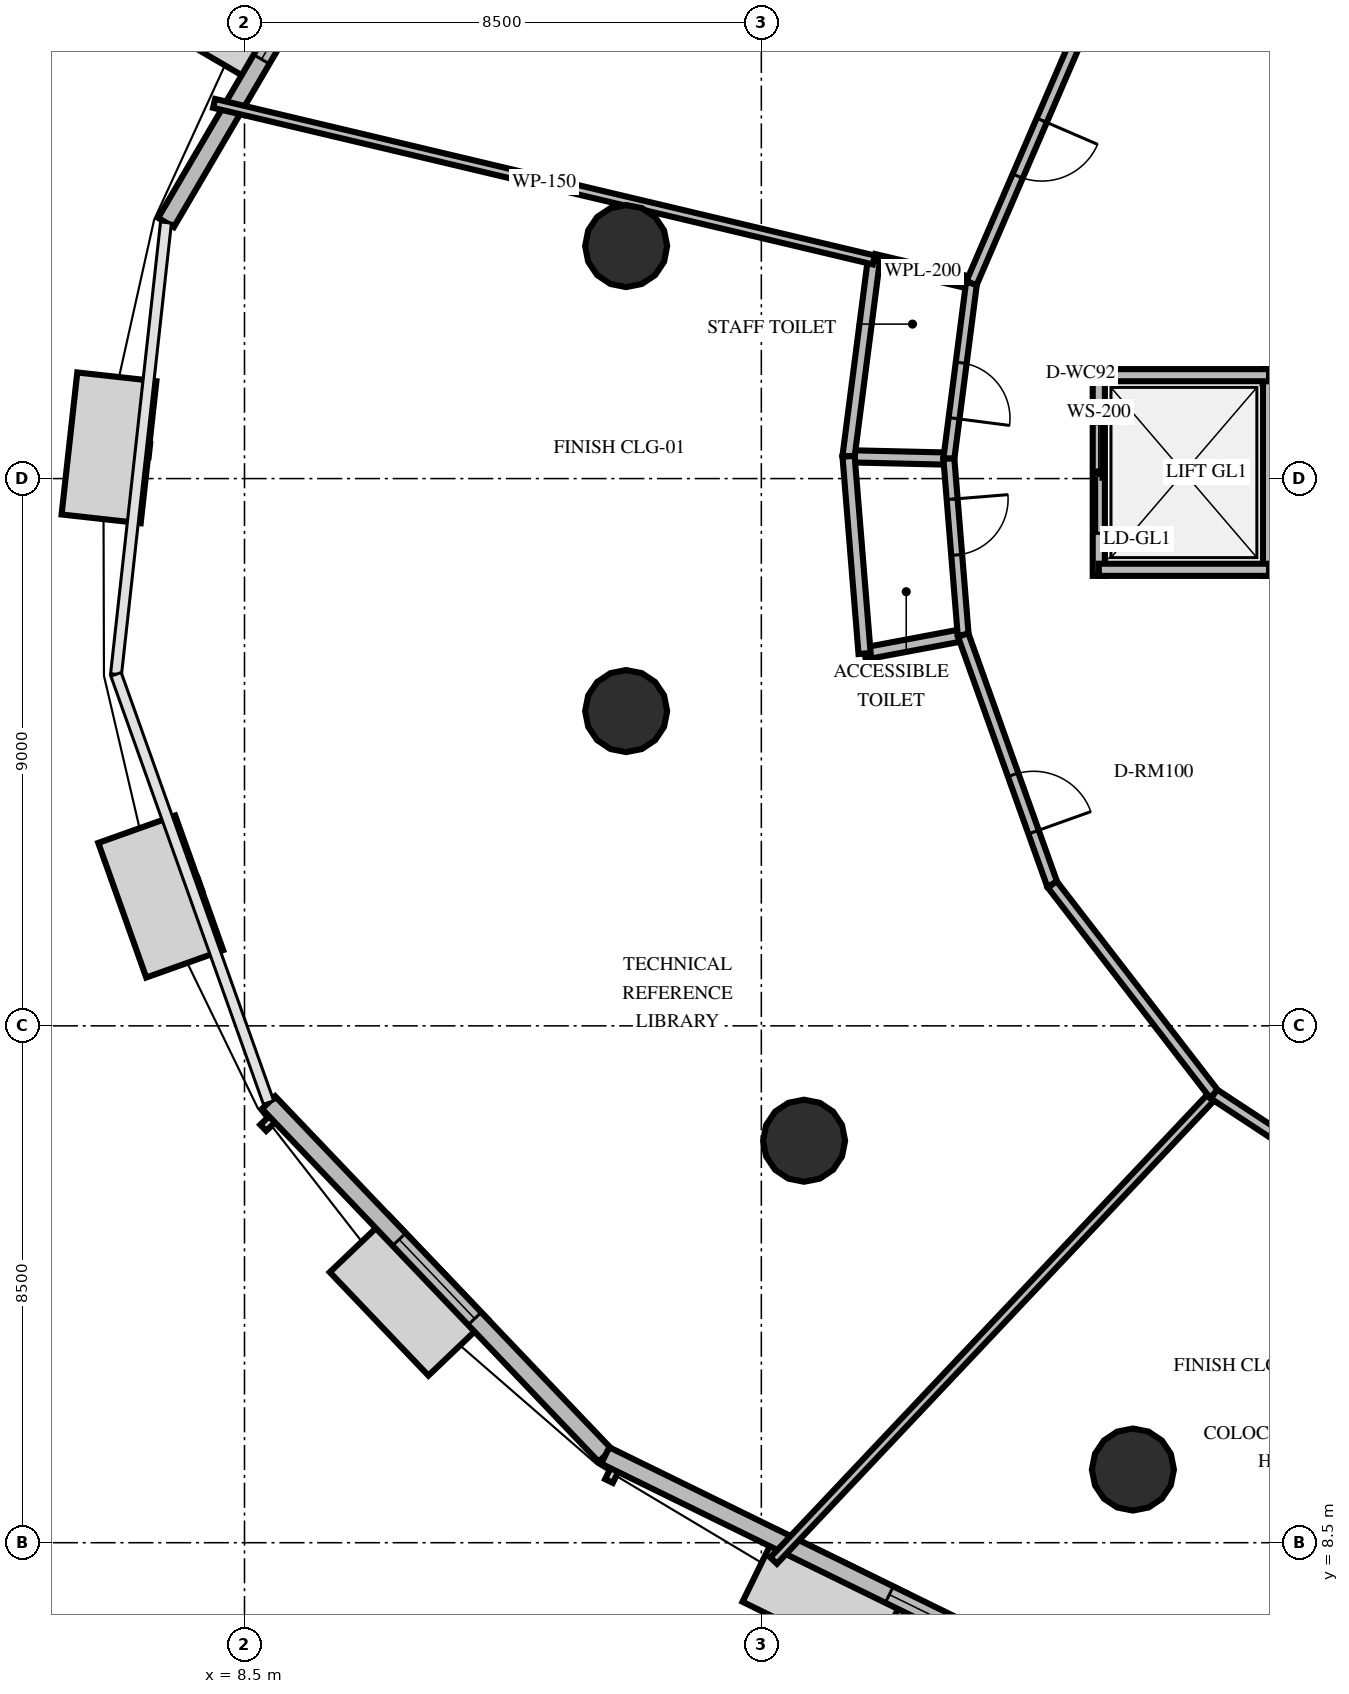
"""IFC4 building model, lengths in metres.
Left out: names, types, materials, properties, quantities, classifications, styles, units other than length and angle.
Written with IfcOpenShell. Run it as: python <this file> out.ifc"""

import sys

from ifc_helpers import new_model, si_unit, direction, frame, frame_2d, origin, origin_2d, place, context, subcontext, project, spatial, rectangle, circle, extrude, element, fill, save


model = new_model("IFC4")
c1 = context("Model", 3, precision=1e-05, world=origin(), true_north=direction((0.0, 1.0)))
c2 = subcontext(c1, "Body", "Model", "MODEL_VIEW")
j1 = project(units=[si_unit("LENGTHUNIT", "METRE"), si_unit("PLANEANGLEUNIT", "RADIAN")], contexts=[c1])
p1 = place(None, origin())
s1 = spatial("IfcSite", under=j1, at=p1, CompositionType="ELEMENT")
p2 = place(p1, origin())
s2 = spatial("IfcBuilding", under=s1, at=p2, CompositionType="ELEMENT")
p3 = place(p2, frame((0.0, 0.0, 59.4)))
s3 = spatial("IfcBuildingStorey", under=s2, at=p3, CompositionType="ELEMENT", Elevation=59.4)
for number, where, z_axis, x_axis in (
    (1, (14.777, 29.824, 0.0), (0.0, 0.0, 1.0), (1.0, 0.0, 0.0)),
    (2, (14.777, 22.176, 0.0), (0.0, 0.0, 1.0), (1.0, 0.0, 0.0)),
    (3, (17.703, 15.111, 0.0), (0.0, 0.0, 1.0), (1.0, 0.0, 0.0)),
    (4, (23.111, 9.703, 0.0), (0.0, 0.0, 1.0), (1.0, 0.0, 0.0)),
):
    element("IfcColumn", number, at=place(p3, frame(where, z_axis=z_axis, x_axis=x_axis)), inside=s3, PredefinedType="COLUMN", context=c2, shape_type="SweptSolid", body=[
        extrude(circle(Radius=0.675, at=origin_2d()), origin(), (0.0, 0.0, 1.0), 4.2),
    ])
p4 = place(p3, frame((11.262, 37.133, 0.0), z_axis=(0.0, 0.0, 1.0), x_axis=(-0.505259367274, -0.862967538081, 0.0)))
e5 = element("IfcWall", 5, at=p4, inside=s3, PredefinedType="SOLIDWALL", context=c2, shape_type="SweptSolid", body=[
    extrude(rectangle(XDim=8.021, YDim=0.3, at=frame_2d((4.011, 0.0))), origin(), (0.0, 0.0, 1.0), 3.0),
])
p5 = place(p4, frame((3.111, 0.0, 0.8)))
e6 = element("IfcOpeningElement", 6, at=p5, cuts=e5, PredefinedType="OPENING", context=c2, shape_type="SweptSolid", body=[
    extrude(rectangle(XDim=1.8, YDim=1.95, at=frame_2d((0.9, 0.975))), frame((0.0, 0.16, 0.0), z_axis=(0.0, -1.0, 0.0), x_axis=(1.0, 0.0, 0.0)), (0.0, 0.0, 1.0), 0.32),
])
p6 = place(p3, frame((8.896, 15.739, 0.0), z_axis=(0.0, 0.0, 1.0), x_axis=(0.690246968725, -0.723573853982, 0.0)))
e7 = element("IfcWall", 7, at=p6, inside=s3, PredefinedType="SOLIDWALL", context=c2, shape_type="SweptSolid", body=[
    extrude(rectangle(XDim=8.021, YDim=0.3, at=frame_2d((4.011, 0.0))), origin(), (0.0, 0.0, 1.0), 3.0),
])
p7 = place(p6, frame((3.111, 0.0, 0.8)))
e8 = element("IfcOpeningElement", 8, at=p7, cuts=e7, PredefinedType="OPENING", context=c2, shape_type="SweptSolid", body=[
    extrude(rectangle(XDim=1.8, YDim=1.95, at=frame_2d((0.9, 0.975))), frame((0.0, 0.16, 0.0), z_axis=(0.0, -1.0, 0.0), x_axis=(1.0, 0.0, 0.0)), (0.0, 0.0, 1.0), 0.32),
])
p8 = place(p3, frame((14.433, 9.935, 0.0), z_axis=(0.0, 0.0, 1.0), x_axis=(0.898122468158, -0.439745417475, 0.0)))
e9 = element("IfcWall", 9, at=p8, inside=s3, PredefinedType="SOLIDWALL", context=c2, shape_type="SweptSolid", body=[
    extrude(rectangle(XDim=8.792, YDim=0.3, at=frame_2d((4.396, 0.0))), origin(), (0.0, 0.0, 1.0), 3.0),
])
p9 = place(p8, frame((5.202, 0.0, 0.8)))
e10 = element("IfcOpeningElement", 10, at=p9, cuts=e9, PredefinedType="OPENING", context=c2, shape_type="SweptSolid", body=[
    extrude(rectangle(XDim=1.8, YDim=1.95, at=frame_2d((0.9, 0.975))), frame((0.0, 0.16, 0.0), z_axis=(0.0, -1.0, 0.0), x_axis=(1.0, 0.0, 0.0)), (0.0, 0.0, 1.0), 0.32),
])
p10 = place(p3, frame((22.55, 24.4, 0.0), z_axis=(0.0, 0.0, 1.0), x_axis=(0.0, 1.0, 0.0)))
e11 = element("IfcWall", 11, at=p10, inside=s3, PredefinedType="SOLIDWALL", context=c2, shape_type="SweptSolid", body=[
    extrude(rectangle(XDim=3.4, YDim=0.2, at=frame_2d((1.7, 0.0))), origin(), (0.0, 0.0, 1.0), 3.0),
])
p11 = place(p10, frame((0.7, 0.0, 0.0)))
e12 = element("IfcOpeningElement", 12, at=p11, cuts=e11, PredefinedType="OPENING", context=c2, shape_type="SweptSolid", body=[
    extrude(rectangle(XDim=1.8, YDim=2.4, at=frame_2d((0.9, 1.2))), frame((0.0, 0.11, 0.0), z_axis=(0.0, -1.0, 0.0), x_axis=(1.0, 0.0, 0.0)), (0.0, 0.0, 1.0), 0.22),
])
p12 = place(p3, frame((25.35, 24.4, 0.0), z_axis=(0.0, 0.0, 1.0), x_axis=(0.0, 1.0, 0.0)))
e13 = element("IfcWall", 13, at=p12, inside=s3, PredefinedType="SOLIDWALL", context=c2, shape_type="SweptSolid", body=[
    extrude(rectangle(XDim=3.4, YDim=0.2, at=frame_2d((1.7, 0.0))), origin(), (0.0, 0.0, 1.0), 3.0),
])
for number, where, z_axis, x_axis in (
    (14, (22.55, 24.5, 0.0), (0.0, 0.0, 1.0), (1.0, 0.0, 0.0)),
    (15, (22.55, 27.7, 0.0), (0.0, 0.0, 1.0), (1.0, 0.0, 0.0)),
):
    element("IfcWall", number, at=place(p3, frame(where, z_axis=z_axis, x_axis=x_axis)), inside=s3, PredefinedType="SOLIDWALL", context=c2, shape_type="SweptSolid", body=[
        extrude(rectangle(XDim=2.8, YDim=0.2, at=frame_2d((1.4, 0.0))), origin(), (0.0, 0.0, 1.0), 3.0),
    ])
for number, where, z_axis, x_axis in (
    (16, (20.456, 29.214, 0.0), (0.0, 0.0, 1.0), (-0.973, 0.231, 0.0)),
    (17, (20.084, 26.328, 0.0), (0.0, 0.0, 1.0), (-1.0, 0.024, 0.0)),
):
    element("IfcWall", number, at=place(p3, frame(where, z_axis=z_axis, x_axis=x_axis)), inside=s3, PredefinedType="PLUMBINGWALL", context=c2, shape_type="SweptSolid", body=[
        extrude(rectangle(XDim=1.65, YDim=0.2, at=frame_2d((0.825, 0.0))), origin(), (0.0, 0.0, 1.0), 3.0),
    ])
p13 = place(p3, frame((18.851, 29.595, 0.0), z_axis=(0.0, 0.0, 1.0), x_axis=(-0.127873768861, -0.991790451273, 0.0)))
e18 = element("IfcWall", 18, at=p13, inside=s3, PredefinedType="PLUMBINGWALL", context=c2, shape_type="SweptSolid", body=[
    extrude(rectangle(XDim=3.255, YDim=0.2, at=frame_2d((1.627, 0.0))), origin(), (0.0, 0.0, 1.0), 3.0),
])
p14 = place(p3, frame((20.456, 29.214, 0.0), z_axis=(0.0, 0.0, 1.0), x_axis=(-0.127854211664, -0.991792972631, 0.0)))
e19 = element("IfcWall", 19, at=p14, inside=s3, PredefinedType="PARTITIONING", context=c2, shape_type="SweptSolid", body=[
    extrude(rectangle(XDim=2.91, YDim=0.18, at=frame_2d((1.455, 0.0))), origin(), (0.0, 0.0, 1.0), 3.0),
])
p15 = place(p14, frame((1.321, 0.0, 0.0)))
e20 = element("IfcOpeningElement", 20, at=p15, cuts=e19, PredefinedType="OPENING", context=c2, shape_type="SweptSolid", body=[
    extrude(rectangle(XDim=0.92, YDim=2.1, at=frame_2d((0.46, 1.05))), frame((0.0, 0.1, 0.0), z_axis=(0.0, -1.0, 0.0), x_axis=(1.0, 0.0, 0.0)), (0.0, 0.0, 1.0), 0.2),
])
p16 = place(p3, frame((20.32, 23.427, 0.0), z_axis=(0.0, 0.0, 1.0), x_axis=(-0.98277489683, -0.184806661569, 0.0)))
e21 = element("IfcWall", 21, at=p16, inside=s3, PredefinedType="PLUMBINGWALL", context=c2, shape_type="SweptSolid", body=[
    extrude(rectangle(XDim=1.65, YDim=0.2, at=frame_2d((0.825, 0.0))), origin(), (0.0, 0.0, 1.0), 3.0),
])
p17 = place(p3, frame((18.434, 26.367, 0.0), z_axis=(0.0, 0.0, 1.0), x_axis=(0.0810837285, -0.996707293528, 0.0)))
e22 = element("IfcWall", 22, at=p17, inside=s3, PredefinedType="PLUMBINGWALL", context=c2, shape_type="SweptSolid", body=[
    extrude(rectangle(XDim=3.255, YDim=0.2, at=frame_2d((1.627, 0.0))), origin(), (0.0, 0.0, 1.0), 3.0),
])
p18 = place(p3, frame((20.084, 26.328, 0.0), z_axis=(0.0, 0.0, 1.0), x_axis=(0.081045642914, -0.996710391119, 0.0)))
e23 = element("IfcWall", 23, at=p18, inside=s3, PredefinedType="PARTITIONING", context=c2, shape_type="SweptSolid", body=[
    extrude(rectangle(XDim=2.91, YDim=0.18, at=frame_2d((1.455, 0.0))), origin(), (0.0, 0.0, 1.0), 3.0),
])
p19 = place(p18, frame((0.669, 0.0, 0.0)))
e24 = element("IfcOpeningElement", 24, at=p19, cuts=e23, PredefinedType="OPENING", context=c2, shape_type="SweptSolid", body=[
    extrude(rectangle(XDim=0.92, YDim=2.1, at=frame_2d((0.46, 1.05))), frame((0.0, 0.1, 0.0), z_axis=(0.0, -1.0, 0.0), x_axis=(1.0, 0.0, 0.0)), (0.0, 0.0, 1.0), 0.2),
])
p20 = place(p3, frame((18.851, 29.595, 0.0), z_axis=(0.0, 0.0, 1.0), x_axis=(-0.972979291155, 0.230892396981, 0.0)))
e25 = element("IfcWall", 25, at=p20, inside=s3, PredefinedType="PARTITIONING", context=c2, shape_type="SweptSolid", body=[
    extrude(rectangle(XDim=11.152, YDim=0.15, at=frame_2d((5.576, 0.0))), origin(), (0.0, 0.0, 1.0), 3.0),
])
p21 = place(p3, frame((24.445, 15.878, 0.0), z_axis=(0.0, 0.0, 1.0), x_axis=(-0.686461796991, -0.72716586916, 0.0)))
e26 = element("IfcWall", 26, at=p21, inside=s3, PredefinedType="PARTITIONING", context=c2, shape_type="SweptSolid", body=[
    extrude(rectangle(XDim=10.55, YDim=0.15, at=frame_2d((5.275, 0.0))), origin(), (0.0, 0.0, 1.0), 3.0),
])
p22 = place(p3, frame((20.32, 23.427, 0.0), z_axis=(0.0, 0.0, 1.0), x_axis=(0.33623696161, -0.941777418315, 0.0)))
e27 = element("IfcWall", 27, at=p22, inside=s3, PredefinedType="PARTITIONING", context=c2, shape_type="SweptSolid", body=[
    extrude(rectangle(XDim=4.355, YDim=0.18, at=frame_2d((2.178, 0.0))), origin(), (0.0, 0.0, 1.0), 3.0),
])
p23 = place(p22, frame((2.441, 0.0, 0.0)))
e28 = element("IfcOpeningElement", 28, at=p23, cuts=e27, PredefinedType="OPENING", context=c2, shape_type="SweptSolid", body=[
    extrude(rectangle(XDim=1.0, YDim=2.15, at=frame_2d((0.5, 1.075))), frame((0.0, 0.1, 0.0), z_axis=(0.0, -1.0, 0.0), x_axis=(1.0, 0.0, 0.0)), (0.0, 0.0, 1.0), 0.2),
])
p24 = place(p3, frame((21.784, 19.326, 0.0), z_axis=(0.0, 0.0, 1.0), x_axis=(0.610850645321, -0.791745848812, 0.0)))
e29 = element("IfcWall", 29, at=p24, inside=s3, PredefinedType="PARTITIONING", context=c2, shape_type="SweptSolid", body=[
    extrude(rectangle(XDim=4.355, YDim=0.18, at=frame_2d((2.178, 0.0))), origin(), (0.0, 0.0, 1.0), 3.0),
])
p25 = place(p3, frame((24.445, 15.878, 0.0), z_axis=(0.0, 0.0, 1.0), x_axis=(0.835329812405, -0.549749128701, 0.0)))
e30 = element("IfcWall", 30, at=p25, inside=s3, PredefinedType="PARTITIONING", context=c2, shape_type="SweptSolid", body=[
    extrude(rectangle(XDim=4.834, YDim=0.18, at=frame_2d((2.417, 0.0))), origin(), (0.0, 0.0, 1.0), 3.0),
])
p26 = place(p3, frame((22.372, 33.653, 0.0), z_axis=(0.0, 0.0, 1.0), x_axis=(-0.396374105142, -0.918089085423, 0.0)))
e31 = element("IfcWall", 31, at=p26, inside=s3, PredefinedType="PARTITIONING", context=c2, shape_type="SweptSolid", body=[
    extrude(rectangle(XDim=4.834, YDim=0.18, at=frame_2d((2.417, 0.0))), origin(), (0.0, 0.0, 1.0), 3.0),
])
p27 = place(p26, frame((1.917, 0.0, 0.0)))
e32 = element("IfcOpeningElement", 32, at=p27, cuts=e31, PredefinedType="OPENING", context=c2, shape_type="SweptSolid", body=[
    extrude(rectangle(XDim=1.0, YDim=2.15, at=frame_2d((0.5, 1.075))), frame((0.0, 0.1, 0.0), z_axis=(0.0, -1.0, 0.0), x_axis=(1.0, 0.0, 0.0)), (0.0, 0.0, 1.0), 0.2),
])
p28 = place(p5, origin())
e33 = element("IfcWindow", 33, at=p28, inside=s3, PartitioningType="SINGLE_PANEL", PredefinedType="WINDOW", context=c2, shape_type="SweptSolid", body=[
    extrude(rectangle(XDim=1.8, YDim=1.95, at=frame_2d((0.9, 0.975))), frame((0.0, 0.03, 0.0), z_axis=(0.0, -1.0, 0.0), x_axis=(1.0, 0.0, 0.0)), (0.0, 0.0, 1.0), 0.06),
])
fill(e6, e33)
p29 = place(p7, origin())
e34 = element("IfcWindow", 34, at=p29, inside=s3, PartitioningType="SINGLE_PANEL", PredefinedType="WINDOW", context=c2, shape_type="SweptSolid", body=[
    extrude(rectangle(XDim=1.8, YDim=1.95, at=frame_2d((0.9, 0.975))), frame((0.0, 0.03, 0.0), z_axis=(0.0, -1.0, 0.0), x_axis=(1.0, 0.0, 0.0)), (0.0, 0.0, 1.0), 0.06),
])
fill(e8, e34)
p30 = place(p9, origin())
e35 = element("IfcWindow", 35, at=p30, inside=s3, PartitioningType="SINGLE_PANEL", PredefinedType="WINDOW", context=c2, shape_type="SweptSolid", body=[
    extrude(rectangle(XDim=1.8, YDim=1.95, at=frame_2d((0.9, 0.975))), frame((0.0, 0.03, 0.0), z_axis=(0.0, -1.0, 0.0), x_axis=(1.0, 0.0, 0.0)), (0.0, 0.0, 1.0), 0.06),
])
fill(e10, e35)
p31 = place(p11, origin())
e36 = element("IfcDoor", 36, at=p31, inside=s3, OperationType="DOUBLE_DOOR_SLIDING", PredefinedType="USERDEFINED", context=c2, shape_type="SweptSolid", body=[
    extrude(rectangle(XDim=1.8, YDim=2.4, at=frame_2d((0.9, 1.2))), frame((0.0, 0.025, 0.0), z_axis=(0.0, -1.0, 0.0), x_axis=(1.0, 0.0, 0.0)), (0.0, 0.0, 1.0), 0.05),
])
fill(e12, e36)
p32 = place(p15, origin())
e37 = element("IfcDoor", 37, at=p32, inside=s3, OperationType="SINGLE_SWING_RIGHT", PredefinedType="DOOR", context=c2, shape_type="SweptSolid", body=[
    extrude(rectangle(XDim=0.92, YDim=2.1, at=frame_2d((0.46, 1.05))), frame((0.0, 0.025, 0.0), z_axis=(0.0, -1.0, 0.0), x_axis=(1.0, 0.0, 0.0)), (0.0, 0.0, 1.0), 0.05),
])
fill(e20, e37)
p33 = place(p19, origin())
e38 = element("IfcDoor", 38, at=p33, inside=s3, OperationType="SINGLE_SWING_LEFT", PredefinedType="DOOR", context=c2, shape_type="SweptSolid", body=[
    extrude(rectangle(XDim=0.92, YDim=2.1, at=frame_2d((0.46, 1.05))), frame((0.0, 0.025, 0.0), z_axis=(0.0, -1.0, 0.0), x_axis=(1.0, 0.0, 0.0)), (0.0, 0.0, 1.0), 0.05),
])
fill(e24, e38)
p34 = place(p23, origin())
e39 = element("IfcDoor", 39, at=p34, inside=s3, OperationType="SINGLE_SWING_RIGHT", PredefinedType="DOOR", context=c2, shape_type="SweptSolid", body=[
    extrude(rectangle(XDim=1.0, YDim=2.15, at=frame_2d((0.5, 1.075))), frame((0.0, 0.025, 0.0), z_axis=(0.0, -1.0, 0.0), x_axis=(1.0, 0.0, 0.0)), (0.0, 0.0, 1.0), 0.05),
])
fill(e28, e39)
p35 = place(p27, origin())
e40 = element("IfcDoor", 40, at=p35, inside=s3, OperationType="SINGLE_SWING_LEFT", PredefinedType="DOOR", context=c2, shape_type="SweptSolid", body=[
    extrude(rectangle(XDim=1.0, YDim=2.15, at=frame_2d((0.5, 1.075))), frame((0.0, 0.025, 0.0), z_axis=(0.0, -1.0, 0.0), x_axis=(1.0, 0.0, 0.0)), (0.0, 0.0, 1.0), 0.05),
])
fill(e32, e40)
save(model, sys.argv[1])
